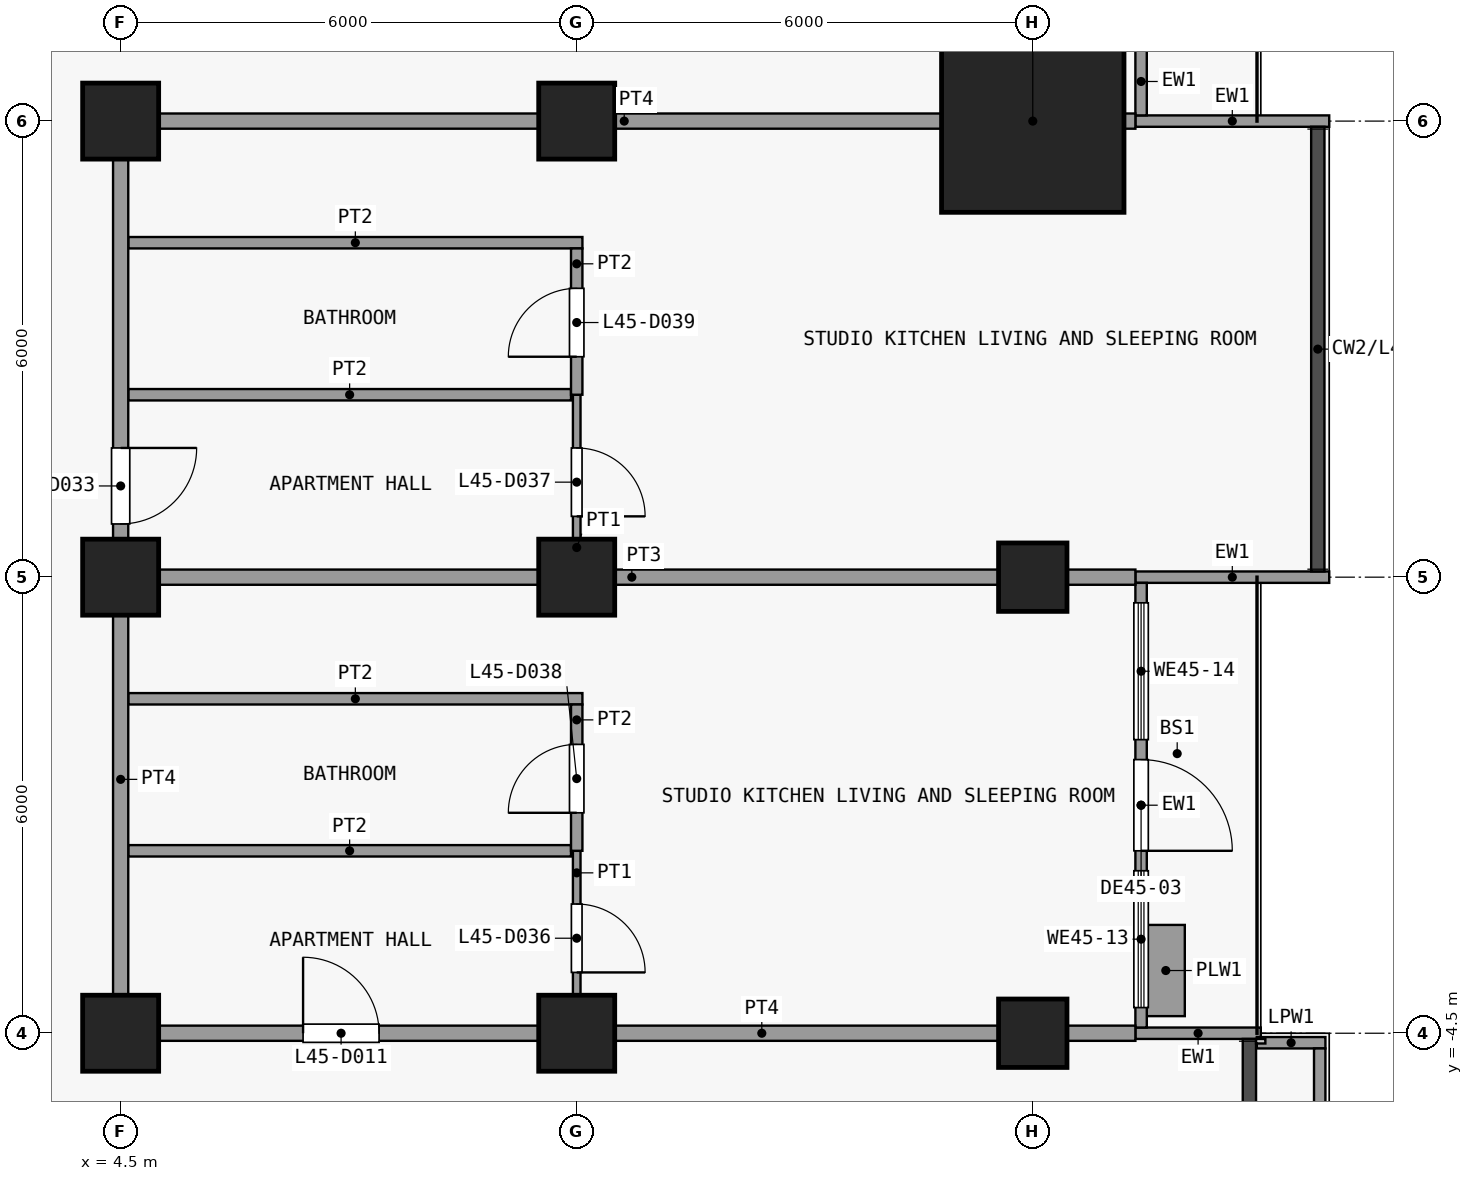
"""IFC4 building model, lengths in metres.
Left out: names, types, materials, properties, quantities, classifications, styles, units other than length and angle.
Written with IfcOpenShell. Run it as: python <this file> out.ifc"""

import sys

from ifc_helpers import new_model, si_unit, direction, frame, frame_2d, origin, origin_2d, place, context, subcontext, project, spatial, rectangle, extrude, element, fill, save


model = new_model("IFC4")
c1 = context("Model", 3, precision=1e-05, world=origin(), true_north=direction((0.0, 1.0)))
c2 = subcontext(c1, "Body", "Model", "MODEL_VIEW")
j1 = project(units=[si_unit("LENGTHUNIT", "METRE"), si_unit("PLANEANGLEUNIT", "RADIAN")], contexts=[c1])
p1 = place(None, origin())
s1 = spatial("IfcSite", under=j1, at=p1, CompositionType="ELEMENT")
p2 = place(p1, origin())
s2 = spatial("IfcBuilding", under=s1, at=p2, CompositionType="ELEMENT")
p3 = place(p2, frame((0.0, 0.0, 181.7)))
s3 = spatial("IfcBuildingStorey", under=s2, at=p3, CompositionType="ELEMENT", Elevation=181.7)
for number, where, z_axis, x_axis in (
    (1, (4.5, -4.5, 0.0), (0.0, 0.0, 1.0), (1.0, 0.0, 0.0)),
    (2, (4.5, 1.5, 0.0), (0.0, 0.0, 1.0), (1.0, 0.0, 0.0)),
    (3, (4.5, 7.5, 0.0), (0.0, 0.0, 1.0), (1.0, 0.0, 0.0)),
    (4, (10.5, -4.5, 0.0), (0.0, 0.0, 1.0), (1.0, 0.0, 0.0)),
    (5, (10.5, 1.5, 0.0), (0.0, 0.0, 1.0), (1.0, 0.0, 0.0)),
    (6, (10.5, 7.5, 0.0), (0.0, 0.0, 1.0), (1.0, 0.0, 0.0)),
):
    element("IfcColumn", number, at=place(p3, frame(where, z_axis=z_axis, x_axis=x_axis)), inside=s3, PredefinedType="COLUMN", context=c2, shape_type="SweptSolid", body=[
        extrude(rectangle(XDim=1.0, YDim=1.0, at=origin_2d()), origin(), (0.0, 0.0, 1.0), 3.6),
    ])
for number, where, z_axis, x_axis in (
    (7, (16.5, -4.5, 0.0), (0.0, 0.0, 1.0), (1.0, 0.0, 0.0)),
    (8, (16.5, 1.5, 0.0), (0.0, 0.0, 1.0), (1.0, 0.0, 0.0)),
):
    element("IfcColumn", number, at=place(p3, frame(where, z_axis=z_axis, x_axis=x_axis)), inside=s3, PredefinedType="COLUMN", context=c2, shape_type="SweptSolid", body=[
        extrude(rectangle(XDim=0.9, YDim=0.9, at=origin_2d()), origin(), (0.0, 0.0, 1.0), 3.6),
    ])
p4 = place(p3, frame((16.5, 7.5, 0.0), z_axis=(0.0, 0.0, 1.0), x_axis=(1.0, 0.0, 0.0)))
e9 = element("IfcColumn", 9, at=p4, inside=s3, PredefinedType="COLUMN", context=c2, shape_type="SweptSolid", body=[
    extrude(rectangle(XDim=2.4, YDim=2.4, at=origin_2d()), origin(), (0.0, 0.0, 1.0), 3.6),
])
p5 = place(p3, frame((17.85, -4.5, 0.0), z_axis=(0.0, 0.0, 1.0), x_axis=(1.0, 0.0, 0.0)))
e10 = element("IfcWall", 10, at=p5, inside=s3, PredefinedType="SOLIDWALL", context=c2, shape_type="SweptSolid", body=[
    extrude(rectangle(XDim=1.65, YDim=0.15, at=frame_2d((0.825, 0.0))), origin(), (0.0, 0.0, 1.0), 3.3),
])
p6 = place(p3, frame((17.85, 1.5, 0.0), z_axis=(0.0, 0.0, 1.0), x_axis=(1.0, 0.0, 0.0)))
e11 = element("IfcWall", 11, at=p6, inside=s3, PredefinedType="SOLIDWALL", context=c2, shape_type="SweptSolid", body=[
    extrude(rectangle(XDim=2.55, YDim=0.15, at=frame_2d((1.275, 0.0))), origin(), (0.0, 0.0, 1.0), 3.3),
])
p7 = place(p3, frame((17.925, 1.425, 0.0), z_axis=(0.0, 0.0, 1.0), x_axis=(0.0, -1.0, 0.0)))
e12 = element("IfcWall", 12, at=p7, inside=s3, PredefinedType="SOLIDWALL", context=c2, shape_type="SweptSolid", body=[
    extrude(rectangle(XDim=5.85, YDim=0.15, at=frame_2d((2.925, 0.0))), origin(), (0.0, 0.0, 1.0), 3.3),
])
p8 = place(p7, frame((2.325, 0.0, 0.0)))
e13 = element("IfcOpeningElement", 13, at=p8, cuts=e12, PredefinedType="OPENING", context=c2, shape_type="SweptSolid", body=[
    extrude(rectangle(XDim=1.2, YDim=2.4, at=frame_2d((0.6, 1.2))), frame((0.0, 0.085, 0.0), z_axis=(0.0, -1.0, 0.0), x_axis=(1.0, 0.0, 0.0)), (0.0, 0.0, 1.0), 0.17),
])
p9 = place(p7, frame((3.788, 0.0, 0.9)))
e14 = element("IfcOpeningElement", 14, at=p9, cuts=e12, PredefinedType="OPENING", context=c2, shape_type="SweptSolid", body=[
    extrude(rectangle(XDim=1.8, YDim=2.1, at=frame_2d((0.9, 1.05))), frame((0.0, 0.085, 0.0), z_axis=(0.0, -1.0, 0.0), x_axis=(1.0, 0.0, 0.0)), (0.0, 0.0, 1.0), 0.17),
])
p10 = place(p7, frame((0.262, 0.0, 0.9)))
e15 = element("IfcOpeningElement", 15, at=p10, cuts=e12, PredefinedType="OPENING", context=c2, shape_type="SweptSolid", body=[
    extrude(rectangle(XDim=1.8, YDim=2.1, at=frame_2d((0.9, 1.05))), frame((0.0, 0.085, 0.0), z_axis=(0.0, -1.0, 0.0), x_axis=(1.0, 0.0, 0.0)), (0.0, 0.0, 1.0), 0.17),
])
p11 = place(p3, frame((18.25, -4.275, 0.0), z_axis=(0.0, 0.0, 1.0), x_axis=(0.0, 1.0, 0.0)))
e16 = element("IfcWall", 16, at=p11, inside=s3, PredefinedType="USERDEFINED", context=c2, shape_type="SweptSolid", body=[
    extrude(rectangle(XDim=1.2, YDim=0.5, at=frame_2d((0.6, 0.0))), origin(), (0.0, 0.0, 1.0), 0.9),
])
p12 = place(p3, frame((17.85, 7.5, 0.0), z_axis=(0.0, 0.0, 1.0), x_axis=(1.0, 0.0, 0.0)))
e17 = element("IfcWall", 17, at=p12, inside=s3, PredefinedType="SOLIDWALL", context=c2, shape_type="SweptSolid", body=[
    extrude(rectangle(XDim=2.55, YDim=0.15, at=frame_2d((1.275, 0.0))), origin(), (0.0, 0.0, 1.0), 3.3),
])
p13 = place(p3, frame((17.925, 13.425, 0.0), z_axis=(0.0, 0.0, 1.0), x_axis=(0.0, -1.0, 0.0)))
e18 = element("IfcWall", 18, at=p13, inside=s3, PredefinedType="SOLIDWALL", context=c2, shape_type="SweptSolid", body=[
    extrude(rectangle(XDim=5.85, YDim=0.15, at=frame_2d((2.925, 0.0))), origin(), (0.0, 0.0, 1.0), 3.3),
])
p14 = place(p13, frame((0.825, 0.0, 0.0)))
e19 = element("IfcOpeningElement", 19, at=p14, cuts=e18, PredefinedType="OPENING", context=c2, shape_type="SweptSolid", body=[
    extrude(rectangle(XDim=1.2, YDim=2.4, at=frame_2d((0.6, 1.2))), frame((0.0, 0.085, 0.0), z_axis=(0.0, -1.0, 0.0), x_axis=(1.0, 0.0, 0.0)), (0.0, 0.0, 1.0), 0.17),
])
p15 = place(p13, frame((3.038, 0.0, 0.9)))
e20 = element("IfcOpeningElement", 20, at=p15, cuts=e18, PredefinedType="OPENING", context=c2, shape_type="SweptSolid", body=[
    extrude(rectangle(XDim=1.8, YDim=2.1, at=frame_2d((0.9, 1.05))), frame((0.0, 0.085, 0.0), z_axis=(0.0, -1.0, 0.0), x_axis=(1.0, 0.0, 0.0)), (0.0, 0.0, 1.0), 0.17),
])
p16 = place(p3, frame((19.448, -4.625, 0.0), z_axis=(0.0, 0.0, 1.0), x_axis=(1.0, 0.0, 0.0)))
e21 = element("IfcWall", 21, at=p16, inside=s3, PredefinedType="PARAPET", context=c2, shape_type="SweptSolid", body=[
    extrude(rectangle(XDim=0.903, YDim=0.15, at=frame_2d((0.451, 0.0))), origin(), (0.0, 0.0, 1.0), 1.15),
])
p17 = place(p3, frame((20.275, -4.7, 0.0), z_axis=(0.0, 0.0, 1.0), x_axis=(0.0, -1.0, 0.0)))
e22 = element("IfcWall", 22, at=p17, inside=s3, PredefinedType="PARAPET", context=c2, shape_type="SweptSolid", body=[
    extrude(rectangle(XDim=8.75, YDim=0.15, at=frame_2d((4.375, 0.0))), origin(), (0.0, 0.0, 1.0), 1.15),
])
p18 = place(p3, frame((4.4, -4.5, 0.0), z_axis=(0.0, 0.0, 1.0), x_axis=(1.0, 0.0, 0.0)))
e23 = element("IfcWall", 23, at=p18, inside=s3, PredefinedType="PARTITIONING", context=c2, shape_type="SweptSolid", body=[
    extrude(rectangle(XDim=13.45, YDim=0.2, at=frame_2d((6.725, 0.0))), origin(), (0.0, 0.0, 1.0), 3.3),
])
p19 = place(p18, frame((2.5, 0.0, 0.0)))
e24 = element("IfcOpeningElement", 24, at=p19, cuts=e23, PredefinedType="OPENING", context=c2, shape_type="SweptSolid", body=[
    extrude(rectangle(XDim=1.0, YDim=2.1, at=frame_2d((0.5, 1.05))), frame((0.0, 0.11, 0.0), z_axis=(0.0, -1.0, 0.0), x_axis=(1.0, 0.0, 0.0)), (0.0, 0.0, 1.0), 0.22),
])
p20 = place(p3, frame((4.6, -2.1, 0.0), z_axis=(0.0, 0.0, 1.0), x_axis=(1.0, 0.0, 0.0)))
e25 = element("IfcWall", 25, at=p20, inside=s3, PredefinedType="PARTITIONING", context=c2, shape_type="SweptSolid", body=[
    extrude(rectangle(XDim=5.825, YDim=0.15, at=frame_2d((2.913, 0.0))), origin(), (0.0, 0.0, 1.0), 3.3),
])
p21 = place(p3, frame((4.6, -0.1, 0.0), z_axis=(0.0, 0.0, 1.0), x_axis=(1.0, 0.0, 0.0)))
e26 = element("IfcWall", 26, at=p21, inside=s3, PredefinedType="PARTITIONING", context=c2, shape_type="SweptSolid", body=[
    extrude(rectangle(XDim=5.975, YDim=0.15, at=frame_2d((2.987, 0.0))), origin(), (0.0, 0.0, 1.0), 3.3),
])
p22 = place(p3, frame((4.6, 1.5, 0.0), z_axis=(0.0, 0.0, 1.0), x_axis=(1.0, 0.0, 0.0)))
e27 = element("IfcWall", 27, at=p22, inside=s3, PredefinedType="PARTITIONING", context=c2, shape_type="SweptSolid", body=[
    extrude(rectangle(XDim=13.25, YDim=0.2, at=frame_2d((6.625, 0.0))), origin(), (0.0, 0.0, 1.0), 3.3),
])
p23 = place(p3, frame((4.6, 3.9, 0.0), z_axis=(0.0, 0.0, 1.0), x_axis=(1.0, 0.0, 0.0)))
e28 = element("IfcWall", 28, at=p23, inside=s3, PredefinedType="PARTITIONING", context=c2, shape_type="SweptSolid", body=[
    extrude(rectangle(XDim=5.825, YDim=0.15, at=frame_2d((2.913, 0.0))), origin(), (0.0, 0.0, 1.0), 3.3),
])
p24 = place(p3, frame((4.6, 5.9, 0.0), z_axis=(0.0, 0.0, 1.0), x_axis=(1.0, 0.0, 0.0)))
e29 = element("IfcWall", 29, at=p24, inside=s3, PredefinedType="PARTITIONING", context=c2, shape_type="SweptSolid", body=[
    extrude(rectangle(XDim=5.975, YDim=0.15, at=frame_2d((2.987, 0.0))), origin(), (0.0, 0.0, 1.0), 3.3),
])
p25 = place(p3, frame((4.4, 7.5, 0.0), z_axis=(0.0, 0.0, 1.0), x_axis=(1.0, 0.0, 0.0)))
e30 = element("IfcWall", 30, at=p25, inside=s3, PredefinedType="PARTITIONING", context=c2, shape_type="SweptSolid", body=[
    extrude(rectangle(XDim=13.45, YDim=0.2, at=frame_2d((6.725, 0.0))), origin(), (0.0, 0.0, 1.0), 3.3),
])
p26 = place(p3, frame((4.5, -4.4, 0.0), z_axis=(0.0, 0.0, 1.0), x_axis=(0.0, 1.0, 0.0)))
e31 = element("IfcWall", 31, at=p26, inside=s3, PredefinedType="PARTITIONING", context=c2, shape_type="SweptSolid", body=[
    extrude(rectangle(XDim=11.8, YDim=0.2, at=frame_2d((5.9, 0.0))), origin(), (0.0, 0.0, 1.0), 3.3),
])
p27 = place(p26, frame((6.6, 0.0, 0.0)))
e32 = element("IfcOpeningElement", 32, at=p27, cuts=e31, PredefinedType="OPENING", context=c2, shape_type="SweptSolid", body=[
    extrude(rectangle(XDim=1.0, YDim=2.1, at=frame_2d((0.5, 1.05))), frame((0.0, 0.11, 0.0), z_axis=(0.0, -1.0, 0.0), x_axis=(1.0, 0.0, 0.0)), (0.0, 0.0, 1.0), 0.22),
])
p28 = place(p3, frame((10.5, -4.4, 0.0), z_axis=(0.0, 0.0, 1.0), x_axis=(0.0, 1.0, 0.0)))
e33 = element("IfcWall", 33, at=p28, inside=s3, PredefinedType="PARTITIONING", context=c2, shape_type="SweptSolid", body=[
    extrude(rectangle(XDim=2.3, YDim=0.1, at=frame_2d((1.15, 0.0))), origin(), (0.0, 0.0, 1.0), 3.3),
])
p29 = place(p28, frame((0.7, 0.0, 0.0)))
e34 = element("IfcOpeningElement", 34, at=p29, cuts=e33, PredefinedType="OPENING", context=c2, shape_type="SweptSolid", body=[
    extrude(rectangle(XDim=0.9, YDim=2.1, at=frame_2d((0.45, 1.05))), frame((0.0, 0.06, 0.0), z_axis=(0.0, -1.0, 0.0), x_axis=(1.0, 0.0, 0.0)), (0.0, 0.0, 1.0), 0.12),
])
p30 = place(p3, frame((10.5, 1.6, 0.0), z_axis=(0.0, 0.0, 1.0), x_axis=(0.0, 1.0, 0.0)))
e35 = element("IfcWall", 35, at=p30, inside=s3, PredefinedType="PARTITIONING", context=c2, shape_type="SweptSolid", body=[
    extrude(rectangle(XDim=2.3, YDim=0.1, at=frame_2d((1.15, 0.0))), origin(), (0.0, 0.0, 1.0), 3.3),
])
p31 = place(p30, frame((0.7, 0.0, 0.0)))
e36 = element("IfcOpeningElement", 36, at=p31, cuts=e35, PredefinedType="OPENING", context=c2, shape_type="SweptSolid", body=[
    extrude(rectangle(XDim=0.9, YDim=2.1, at=frame_2d((0.45, 1.05))), frame((0.0, 0.06, 0.0), z_axis=(0.0, -1.0, 0.0), x_axis=(1.0, 0.0, 0.0)), (0.0, 0.0, 1.0), 0.12),
])
p32 = place(p3, frame((10.5, -2.1, 0.0), z_axis=(0.0, 0.0, 1.0), x_axis=(0.0, 1.0, 0.0)))
e37 = element("IfcWall", 37, at=p32, inside=s3, PredefinedType="PARTITIONING", context=c2, shape_type="SweptSolid", body=[
    extrude(rectangle(XDim=1.925, YDim=0.15, at=frame_2d((0.962, 0.0))), origin(), (0.0, 0.0, 1.0), 3.3),
])
p33 = place(p32, frame((0.5, 0.0, 0.0)))
e38 = element("IfcOpeningElement", 38, at=p33, cuts=e37, PredefinedType="OPENING", context=c2, shape_type="SweptSolid", body=[
    extrude(rectangle(XDim=0.9, YDim=2.1, at=frame_2d((0.45, 1.05))), frame((0.0, 0.085, 0.0), z_axis=(0.0, -1.0, 0.0), x_axis=(1.0, 0.0, 0.0)), (0.0, 0.0, 1.0), 0.17),
])
p34 = place(p3, frame((10.5, 3.9, 0.0), z_axis=(0.0, 0.0, 1.0), x_axis=(0.0, 1.0, 0.0)))
e39 = element("IfcWall", 39, at=p34, inside=s3, PredefinedType="PARTITIONING", context=c2, shape_type="SweptSolid", body=[
    extrude(rectangle(XDim=1.925, YDim=0.15, at=frame_2d((0.962, 0.0))), origin(), (0.0, 0.0, 1.0), 3.3),
])
p35 = place(p34, frame((0.5, 0.0, 0.0)))
e40 = element("IfcOpeningElement", 40, at=p35, cuts=e39, PredefinedType="OPENING", context=c2, shape_type="SweptSolid", body=[
    extrude(rectangle(XDim=0.9, YDim=2.1, at=frame_2d((0.45, 1.05))), frame((0.0, 0.085, 0.0), z_axis=(0.0, -1.0, 0.0), x_axis=(1.0, 0.0, 0.0)), (0.0, 0.0, 1.0), 0.17),
])
p36 = place(p8, origin())
e41 = element("IfcDoor", 41, at=p36, inside=s3, OperationType="SINGLE_SWING_RIGHT", PredefinedType="DOOR", context=c2, shape_type="SweptSolid", body=[
    extrude(rectangle(XDim=1.2, YDim=2.4, at=frame_2d((0.6, 1.2))), frame((0.0, 0.025, 0.0), z_axis=(0.0, -1.0, 0.0), x_axis=(1.0, 0.0, 0.0)), (0.0, 0.0, 1.0), 0.05),
])
fill(e13, e41)
p37 = place(p9, origin())
e42 = element("IfcWindow", 42, at=p37, inside=s3, PartitioningType="SINGLE_PANEL", PredefinedType="WINDOW", context=c2, shape_type="SweptSolid", body=[
    extrude(rectangle(XDim=1.8, YDim=2.1, at=frame_2d((0.9, 1.05))), frame((0.0, 0.03, 0.0), z_axis=(0.0, -1.0, 0.0), x_axis=(1.0, 0.0, 0.0)), (0.0, 0.0, 1.0), 0.06),
])
fill(e14, e42)
p38 = place(p10, origin())
e43 = element("IfcWindow", 43, at=p38, inside=s3, PartitioningType="SINGLE_PANEL", PredefinedType="WINDOW", context=c2, shape_type="SweptSolid", body=[
    extrude(rectangle(XDim=1.8, YDim=2.1, at=frame_2d((0.9, 1.05))), frame((0.0, 0.03, 0.0), z_axis=(0.0, -1.0, 0.0), x_axis=(1.0, 0.0, 0.0)), (0.0, 0.0, 1.0), 0.06),
])
fill(e15, e43)
p39 = place(p19, origin())
e44 = element("IfcDoor", 44, at=p39, inside=s3, OperationType="SINGLE_SWING_RIGHT", PredefinedType="DOOR", context=c2, shape_type="SweptSolid", body=[
    extrude(rectangle(XDim=1.0, YDim=2.1, at=frame_2d((0.5, 1.05))), frame((0.0, 0.025, 0.0), z_axis=(0.0, -1.0, 0.0), x_axis=(1.0, 0.0, 0.0)), (0.0, 0.0, 1.0), 0.05),
])
fill(e24, e44)
p40 = place(p27, origin())
e45 = element("IfcDoor", 45, at=p40, inside=s3, OperationType="SINGLE_SWING_RIGHT", PredefinedType="DOOR", context=c2, shape_type="SweptSolid", body=[
    extrude(rectangle(XDim=1.0, YDim=2.1, at=frame_2d((0.5, 1.05))), frame((0.0, 0.025, 0.0), z_axis=(0.0, -1.0, 0.0), x_axis=(1.0, 0.0, 0.0)), (0.0, 0.0, 1.0), 0.05),
])
fill(e32, e45)
p41 = place(p29, origin())
e46 = element("IfcDoor", 46, at=p41, inside=s3, OperationType="SINGLE_SWING_LEFT", PredefinedType="DOOR", context=c2, shape_type="SweptSolid", body=[
    extrude(rectangle(XDim=0.9, YDim=2.1, at=frame_2d((0.45, 1.05))), frame((0.0, 0.025, 0.0), z_axis=(0.0, -1.0, 0.0), x_axis=(1.0, 0.0, 0.0)), (0.0, 0.0, 1.0), 0.05),
])
fill(e34, e46)
p42 = place(p31, origin())
e47 = element("IfcDoor", 47, at=p42, inside=s3, OperationType="SINGLE_SWING_LEFT", PredefinedType="DOOR", context=c2, shape_type="SweptSolid", body=[
    extrude(rectangle(XDim=0.9, YDim=2.1, at=frame_2d((0.45, 1.05))), frame((0.0, 0.025, 0.0), z_axis=(0.0, -1.0, 0.0), x_axis=(1.0, 0.0, 0.0)), (0.0, 0.0, 1.0), 0.05),
])
fill(e36, e47)
p43 = place(p33, origin())
e48 = element("IfcDoor", 48, at=p43, inside=s3, OperationType="SINGLE_SWING_RIGHT", PredefinedType="DOOR", context=c2, shape_type="SweptSolid", body=[
    extrude(rectangle(XDim=0.9, YDim=2.1, at=frame_2d((0.45, 1.05))), frame((0.0, 0.025, 0.0), z_axis=(0.0, -1.0, 0.0), x_axis=(1.0, 0.0, 0.0)), (0.0, 0.0, 1.0), 0.05),
])
fill(e38, e48)
p44 = place(p35, origin())
e49 = element("IfcDoor", 49, at=p44, inside=s3, OperationType="SINGLE_SWING_RIGHT", PredefinedType="DOOR", context=c2, shape_type="SweptSolid", body=[
    extrude(rectangle(XDim=0.9, YDim=2.1, at=frame_2d((0.45, 1.05))), frame((0.0, 0.025, 0.0), z_axis=(0.0, -1.0, 0.0), x_axis=(1.0, 0.0, 0.0)), (0.0, 0.0, 1.0), 0.05),
])
fill(e40, e49)
save(model, sys.argv[1])
